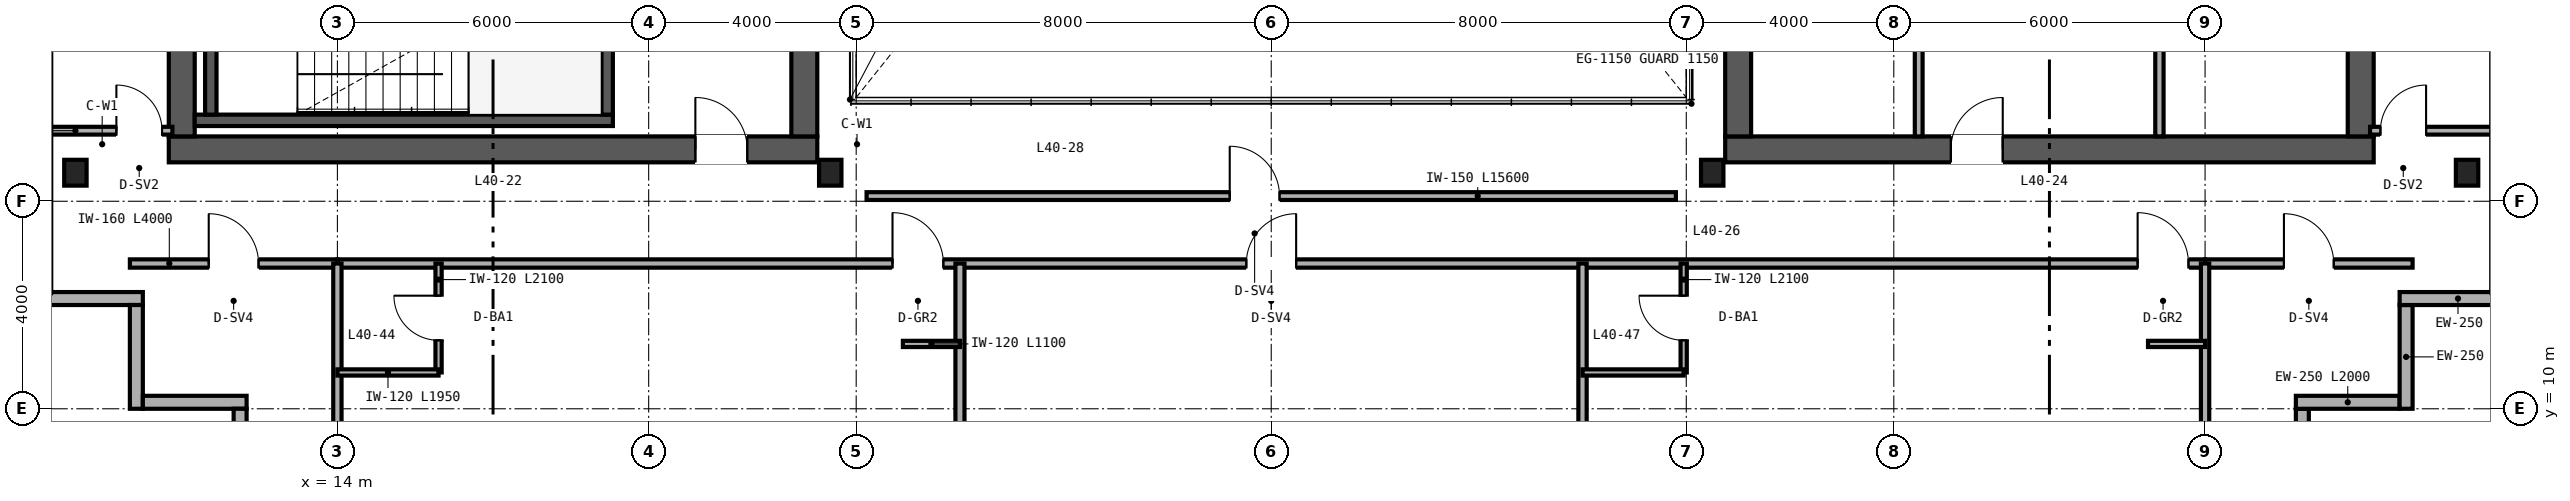
"""IFC4 building model, lengths in metres.
Left out: names, types, materials, properties, quantities, classifications, styles, units other than length and angle.
Written with IfcOpenShell. Run it as: python <this file> out.ifc"""

import sys

from ifc_helpers import new_model, si_unit, direction, frame, frame_2d, origin, origin_2d, place, context, subcontext, project, spatial, rectangle, i_section, extrude, source, transform, mapped, element, fill, save


model = new_model("IFC4")
c1 = context("Model", 3, precision=1e-05, world=origin(), true_north=direction((0.0, 1.0)))
c2 = subcontext(c1, "Body", "Model", "MODEL_VIEW")
j1 = project(units=[si_unit("LENGTHUNIT", "METRE"), si_unit("PLANEANGLEUNIT", "RADIAN")], contexts=[c1])
p1 = place(None, origin())
s1 = spatial("IfcSite", under=j1, at=p1, CompositionType="ELEMENT")
p2 = place(p1, origin())
s2 = spatial("IfcBuilding", under=s1, at=p2, CompositionType="ELEMENT")
p3 = place(p2, frame((0.0, 0.0, 163.2)))
s3 = spatial("IfcBuildingStorey", under=s2, at=p3, CompositionType="ELEMENT", Elevation=163.2)
p4 = place(p3, frame((10.75, 15.0, 0.0), z_axis=(0.0, 0.0, 1.0), x_axis=(1.0, 0.0, 0.0)))
e1 = element("IfcWall", 1, at=p4, inside=s3, PredefinedType="SHEAR", context=c2, shape_type="SweptSolid", body=[
    extrude(rectangle(XDim=12.5, YDim=0.5, at=frame_2d((6.25, 0.0))), origin(), (0.0, 0.0, 1.0), 3.37),
])
p5 = place(p4, frame((10.15, 0.0, 0.0)))
e2 = element("IfcOpeningElement", 2, at=p5, cuts=e1, PredefinedType="OPENING", context=c2, shape_type="SweptSolid", body=[
    extrude(rectangle(XDim=1.0, YDim=2.15, at=frame_2d((0.5, 1.075))), frame((0.0, 0.26, 0.0), z_axis=(0.0, -1.0, 0.0), x_axis=(1.0, 0.0, 0.0)), (0.0, 0.0, 1.0), 0.52),
])
for number, where, z_axis, x_axis in (
    (3, (11.0, 15.25, 0.0), (0.0, 0.0, 1.0), (0.0, 1.0, 0.0)),
    (4, (23.0, 15.25, 0.0), (0.0, 0.0, 1.0), (0.0, 1.0, 0.0)),
):
    element("IfcWall", number, at=place(p3, frame(where, z_axis=z_axis, x_axis=x_axis)), inside=s3, PredefinedType="SHEAR", context=c2, shape_type="SweptSolid", body=[
        extrude(rectangle(XDim=21.5, YDim=0.5, at=frame_2d((10.75, 0.0))), origin(), (0.0, 0.0, 1.0), 3.37),
    ])
p6 = place(p3, frame((40.75, 15.0, 0.0), z_axis=(0.0, 0.0, 1.0), x_axis=(1.0, 0.0, 0.0)))
e5 = element("IfcWall", 5, at=p6, inside=s3, PredefinedType="SHEAR", context=c2, shape_type="SweptSolid", body=[
    extrude(rectangle(XDim=12.5, YDim=0.5, at=frame_2d((6.25, 0.0))), origin(), (0.0, 0.0, 1.0), 3.37),
])
p7 = place(p6, frame((4.35, 0.0, 0.0)))
e6 = element("IfcOpeningElement", 6, at=p7, cuts=e5, PredefinedType="OPENING", context=c2, shape_type="SweptSolid", body=[
    extrude(rectangle(XDim=1.0, YDim=2.15, at=frame_2d((0.5, 1.075))), frame((0.0, 0.26, 0.0), z_axis=(0.0, -1.0, 0.0), x_axis=(1.0, 0.0, 0.0)), (0.0, 0.0, 1.0), 0.52),
])
for number, where, z_axis, x_axis in (
    (7, (41.0, 15.25, 0.0), (0.0, 0.0, 1.0), (0.0, 1.0, 0.0)),
    (8, (53.0, 15.25, 0.0), (0.0, 0.0, 1.0), (0.0, 1.0, 0.0)),
):
    element("IfcWall", number, at=place(p3, frame(where, z_axis=z_axis, x_axis=x_axis)), inside=s3, PredefinedType="SHEAR", context=c2, shape_type="SweptSolid", body=[
        extrude(rectangle(XDim=21.5, YDim=0.5, at=frame_2d((10.75, 0.0))), origin(), (0.0, 0.0, 1.0), 3.37),
    ])
p8 = place(p3, frame((11.25, 15.56, 0.0), z_axis=(0.0, 0.0, 1.0), x_axis=(1.0, 0.0, 0.0)))
e9 = element("IfcWall", 9, at=p8, inside=s3, PredefinedType="SHEAR", context=c2, shape_type="SweptSolid", body=[
    extrude(rectangle(XDim=8.06, YDim=0.22, at=frame_2d((4.03, 0.0))), origin(), (0.0, 0.0, 1.0), 3.4),
])
for number, where, z_axis, x_axis in (
    (10, (11.56, 15.67, 0.0), (0.0, 0.0, 1.0), (0.0, 1.0, 0.0)),
    (11, (19.2, 15.67, 0.0), (0.0, 0.0, 1.0), (0.0, 1.0, 0.0)),
):
    element("IfcWall", number, at=place(p3, frame(where, z_axis=z_axis, x_axis=x_axis)), inside=s3, PredefinedType="SHEAR", context=c2, shape_type="SweptSolid", body=[
        extrude(rectangle(XDim=3.28, YDim=0.22, at=frame_2d((1.64, 0.0))), origin(), (0.0, 0.0, 1.0), 3.4),
    ])
m1 = source(origin(), c2, "Body", "SweptSolid", [
    extrude(i_section(OverallWidth=0.432, OverallDepth=0.498, WebThickness=0.056, FlangeThickness=0.089, FilletRadius=0.025, at=origin_2d()), origin(), (0.0, 0.0, 1.0), 3.37),
])
for number, where, z_axis, x_axis in (
    (12, (8.95, 14.55, 0.0), (0.0, 0.0, 1.0), (1.0, 0.0, 0.0)),
    (13, (23.5, 14.55, 0.0), (0.0, 0.0, 1.0), (1.0, 0.0, 0.0)),
    (14, (40.5, 14.55, 0.0), (0.0, 0.0, 1.0), (1.0, 0.0, 0.0)),
    (15, (55.05, 14.55, 0.0), (0.0, 0.0, 1.0), (1.0, 0.0, 0.0)),
):
    element("IfcColumn", number, at=place(p3, frame(where, z_axis=z_axis, x_axis=x_axis)), inside=s3, PredefinedType="COLUMN", context=c2, shape_type="MappedRepresentation", body=[
        mapped(m1, transform((0.0, 0.0, 0.0), scale=1.0)),
    ])
p9 = place(p3, frame((51.875, 8.0, 0.0), z_axis=(0.0, 0.0, 1.0), x_axis=(0.0, 1.0, 0.0)))
e16 = element("IfcWall", 16, at=p9, inside=s3, PredefinedType="SOLIDWALL", context=c2, shape_type="SweptSolid", body=[
    extrude(rectangle(XDim=2.0, YDim=0.25, at=frame_2d((1.0, 0.0))), origin(), (0.0, 0.0, 1.0), 3.37),
])
p10 = place(p9, frame((0.5, 0.0, 0.85)))
e17 = element("IfcOpeningElement", 17, at=p10, cuts=e16, PredefinedType="OPENING", context=c2, shape_type="SweptSolid", body=[
    extrude(rectangle(XDim=1.0, YDim=1.9, at=frame_2d((0.5, 0.95))), frame((0.0, 0.135, 0.0), z_axis=(0.0, -1.0, 0.0), x_axis=(1.0, 0.0, 0.0)), (0.0, 0.0, 1.0), 0.27),
])
for number, where, z_axis, x_axis in (
    (18, (51.75, 10.125, 0.0), (0.0, 0.0, 1.0), (1.0, 0.0, 0.0)),
    (19, (53.875, 10.0, 0.0), (0.0, 0.0, 1.0), (0.0, 1.0, 0.0)),
):
    element("IfcWall", number, at=place(p3, frame(where, z_axis=z_axis, x_axis=x_axis)), inside=s3, PredefinedType="SOLIDWALL", context=c2, shape_type="SweptSolid", body=[
        extrude(rectangle(XDim=2.0, YDim=0.25, at=frame_2d((1.0, 0.0))), origin(), (0.0, 0.0, 1.0), 3.37),
    ])
for number, where, z_axis, x_axis in (
    (20, (53.75, 12.125, 0.0), (0.0, 0.0, 1.0), (1.0, 0.0, 0.0)),
    (21, (8.0, 12.125, 0.0), (0.0, 0.0, 1.0), (1.0, 0.0, 0.0)),
):
    element("IfcWall", number, at=place(p3, frame(where, z_axis=z_axis, x_axis=x_axis)), inside=s3, PredefinedType="SOLIDWALL", context=c2, shape_type="SweptSolid", body=[
        extrude(rectangle(XDim=2.25, YDim=0.25, at=frame_2d((1.125, 0.0))), origin(), (0.0, 0.0, 1.0), 3.37),
    ])
for number, where, z_axis, x_axis in (
    (22, (10.125, 12.0, 0.0), (0.0, 0.0, 1.0), (0.0, -1.0, 0.0)),
    (23, (10.25, 10.125, 0.0), (0.0, 0.0, 1.0), (1.0, 0.0, 0.0)),
    (24, (12.125, 10.0, 0.0), (0.0, 0.0, 1.0), (0.0, -1.0, 0.0)),
):
    element("IfcWall", number, at=place(p3, frame(where, z_axis=z_axis, x_axis=x_axis)), inside=s3, PredefinedType="SOLIDWALL", context=c2, shape_type="SweptSolid", body=[
        extrude(rectangle(XDim=2.0, YDim=0.25, at=frame_2d((1.0, 0.0))), origin(), (0.0, 0.0, 1.0), 3.37),
    ])
p11 = place(p3, frame((49.12, 15.25, 0.0), z_axis=(0.0, 0.0, 1.0), x_axis=(0.0, 1.0, 0.0)))
e25 = element("IfcWall", 25, at=p11, inside=s3, PredefinedType="PARTITIONING", context=c2, shape_type="SweptSolid", body=[
    extrude(rectangle(XDim=16.13, YDim=0.16, at=frame_2d((8.065, 0.0))), origin(), (0.0, 0.0, 1.0), 2.443),
])
p12 = place(p11, frame((4.0, 0.0, 0.0)))
e26 = element("IfcOpeningElement", 26, at=p12, cuts=e25, PredefinedType="OPENING", context=c2, shape_type="SweptSolid", body=[
    extrude(rectangle(XDim=0.92, YDim=2.15, at=frame_2d((0.46, 1.075))), frame((0.0, 0.09, 0.0), z_axis=(0.0, -1.0, 0.0), x_axis=(1.0, 0.0, 0.0)), (0.0, 0.0, 1.0), 0.18),
])
p13 = place(p11, frame((12.0, 0.0, 0.0)))
e27 = element("IfcOpeningElement", 27, at=p13, cuts=e25, PredefinedType="OPENING", context=c2, shape_type="SweptSolid", body=[
    extrude(rectangle(XDim=0.92, YDim=2.15, at=frame_2d((0.46, 1.075))), frame((0.0, 0.09, 0.0), z_axis=(0.0, -1.0, 0.0), x_axis=(1.0, 0.0, 0.0)), (0.0, 0.0, 1.0), 0.18),
])
p14 = place(p3, frame((44.48, 15.25, 0.0), z_axis=(0.0, 0.0, 1.0), x_axis=(0.0, 1.0, 0.0)))
e28 = element("IfcWall", 28, at=p14, inside=s3, PredefinedType="PARTITIONING", context=c2, shape_type="SweptSolid", body=[
    extrude(rectangle(XDim=11.63, YDim=0.15, at=frame_2d((5.815, 0.0))), origin(), (0.0, 0.0, 1.0), 3.37),
])
p15 = place(p14, frame((4.5, 0.0, 0.0)))
e29 = element("IfcOpeningElement", 29, at=p15, cuts=e28, PredefinedType="OPENING", context=c2, shape_type="SweptSolid", body=[
    extrude(rectangle(XDim=0.92, YDim=2.15, at=frame_2d((0.46, 1.075))), frame((0.0, 0.085, 0.0), z_axis=(0.0, -1.0, 0.0), x_axis=(1.0, 0.0, 0.0)), (0.0, 0.0, 1.0), 0.17),
])
p16 = place(p3, frame((24.2, 14.1, 0.0), z_axis=(0.0, 0.0, 1.0), x_axis=(1.0, 0.0, 0.0)))
e30 = element("IfcWall", 30, at=p16, inside=s3, PredefinedType="PARTITIONING", context=c2, shape_type="SweptSolid", body=[
    extrude(rectangle(XDim=15.6, YDim=0.15, at=frame_2d((7.8, 0.0))), origin(), (0.0, 0.0, 1.0), 3.37),
])
p17 = place(p16, frame((7.0, 0.0, 0.0)))
e31 = element("IfcOpeningElement", 31, at=p17, cuts=e30, PredefinedType="OPENING", context=c2, shape_type="SweptSolid", body=[
    extrude(rectangle(XDim=0.96, YDim=2.15, at=frame_2d((0.48, 1.075))), frame((0.0, 0.085, 0.0), z_axis=(0.0, -1.0, 0.0), x_axis=(1.0, 0.0, 0.0)), (0.0, 0.0, 1.0), 0.17),
])
p18 = place(p3, frame((8.16, 15.36, 0.0), z_axis=(0.0, 0.0, 1.0), x_axis=(1.0, 0.0, 0.0)))
e32 = element("IfcWall", 32, at=p18, inside=s3, PredefinedType="PARTITIONING", context=c2, shape_type="SweptSolid", body=[
    extrude(rectangle(XDim=2.66, YDim=0.15, at=frame_2d((1.33, 0.0))), origin(), (0.0, 0.0, 1.0), 2.591),
])
p19 = place(p18, frame((1.58, 0.0, 0.0)))
e33 = element("IfcOpeningElement", 33, at=p19, cuts=e32, PredefinedType="OPENING", context=c2, shape_type="SweptSolid", body=[
    extrude(rectangle(XDim=0.88, YDim=2.15, at=frame_2d((0.44, 1.075))), frame((0.0, 0.085, 0.0), z_axis=(0.0, -1.0, 0.0), x_axis=(1.0, 0.0, 0.0)), (0.0, 0.0, 1.0), 0.17),
])
p20 = place(p3, frame((53.18, 15.36, 0.0), z_axis=(0.0, 0.0, 1.0), x_axis=(1.0, 0.0, 0.0)))
e34 = element("IfcWall", 34, at=p20, inside=s3, PredefinedType="PARTITIONING", context=c2, shape_type="SweptSolid", body=[
    extrude(rectangle(XDim=2.66, YDim=0.15, at=frame_2d((1.33, 0.0))), origin(), (0.0, 0.0, 1.0), 2.591),
])
p21 = place(p20, frame((0.2, 0.0, 0.0)))
e35 = element("IfcOpeningElement", 35, at=p21, cuts=e34, PredefinedType="OPENING", context=c2, shape_type="SweptSolid", body=[
    extrude(rectangle(XDim=0.88, YDim=2.15, at=frame_2d((0.44, 1.075))), frame((0.0, 0.085, 0.0), z_axis=(0.0, -1.0, 0.0), x_axis=(1.0, 0.0, 0.0)), (0.0, 0.0, 1.0), 0.17),
])
p22 = place(p3, frame((10.0, 12.8, 0.0), z_axis=(0.0, 0.0, 1.0), x_axis=(1.0, 0.0, 0.0)))
e36 = element("IfcWall", 36, at=p22, inside=s3, PredefinedType="PARTITIONING", context=c2, shape_type="SweptSolid", body=[
    extrude(rectangle(XDim=4.0, YDim=0.16, at=frame_2d((2.0, 0.0))), origin(), (0.0, 0.0, 1.0), 3.37),
])
p23 = place(p22, frame((1.52, 0.0, 0.0)))
e37 = element("IfcOpeningElement", 37, at=p23, cuts=e36, PredefinedType="OPENING", context=c2, shape_type="SweptSolid", body=[
    extrude(rectangle(XDim=0.96, YDim=2.15, at=frame_2d((0.48, 1.075))), frame((0.0, 0.09, 0.0), z_axis=(0.0, -1.0, 0.0), x_axis=(1.0, 0.0, 0.0)), (0.0, 0.0, 1.0), 0.18),
])
p24 = place(p3, frame((50.0, 12.8, 0.0), z_axis=(0.0, 0.0, 1.0), x_axis=(1.0, 0.0, 0.0)))
e38 = element("IfcWall", 38, at=p24, inside=s3, PredefinedType="PARTITIONING", context=c2, shape_type="SweptSolid", body=[
    extrude(rectangle(XDim=4.0, YDim=0.16, at=frame_2d((2.0, 0.0))), origin(), (0.0, 0.0, 1.0), 3.37),
])
p25 = place(p24, frame((1.52, 0.0, 0.0)))
e39 = element("IfcOpeningElement", 39, at=p25, cuts=e38, PredefinedType="OPENING", context=c2, shape_type="SweptSolid", body=[
    extrude(rectangle(XDim=0.96, YDim=2.15, at=frame_2d((0.48, 1.075))), frame((0.0, 0.09, 0.0), z_axis=(0.0, -1.0, 0.0), x_axis=(1.0, 0.0, 0.0)), (0.0, 0.0, 1.0), 0.18),
])
p26 = place(p3, frame((14.0, 12.8, 0.0), z_axis=(0.0, 0.0, 1.0), x_axis=(1.0, 0.0, 0.0)))
e40 = element("IfcWall", 40, at=p26, inside=s3, PredefinedType="PARTITIONING", context=c2, shape_type="SweptSolid", body=[
    extrude(rectangle(XDim=36.0, YDim=0.16, at=frame_2d((18.0, 0.0))), origin(), (0.0, 0.0, 1.0), 2.913),
])
p27 = place(p26, frame((10.7, 0.0, 0.0)))
e41 = element("IfcOpeningElement", 41, at=p27, cuts=e40, PredefinedType="OPENING", context=c2, shape_type="SweptSolid", body=[
    extrude(rectangle(XDim=0.98, YDim=2.2, at=frame_2d((0.49, 1.1))), frame((0.0, 0.09, 0.0), z_axis=(0.0, -1.0, 0.0), x_axis=(1.0, 0.0, 0.0)), (0.0, 0.0, 1.0), 0.18),
])
p28 = place(p26, frame((17.52, 0.0, 0.0)))
e42 = element("IfcOpeningElement", 42, at=p28, cuts=e40, PredefinedType="OPENING", context=c2, shape_type="SweptSolid", body=[
    extrude(rectangle(XDim=0.96, YDim=2.15, at=frame_2d((0.48, 1.075))), frame((0.0, 0.09, 0.0), z_axis=(0.0, -1.0, 0.0), x_axis=(1.0, 0.0, 0.0)), (0.0, 0.0, 1.0), 0.18),
])
p29 = place(p26, frame((34.7, 0.0, 0.0)))
e43 = element("IfcOpeningElement", 43, at=p29, cuts=e40, PredefinedType="OPENING", context=c2, shape_type="SweptSolid", body=[
    extrude(rectangle(XDim=0.98, YDim=2.2, at=frame_2d((0.49, 1.1))), frame((0.0, 0.09, 0.0), z_axis=(0.0, -1.0, 0.0), x_axis=(1.0, 0.0, 0.0)), (0.0, 0.0, 1.0), 0.18),
])
for number, where, z_axis, x_axis in (
    (44, (14.0, 6.36, 0.0), (0.0, 0.0, 1.0), (0.0, 1.0, 0.0)),
    (45, (50.0, 6.36, 0.0), (0.0, 0.0, 1.0), (0.0, 1.0, 0.0)),
):
    element("IfcWall", number, at=place(p3, frame(where, z_axis=z_axis, x_axis=x_axis)), inside=s3, PredefinedType="PARTITIONING", context=c2, shape_type="SweptSolid", body=[
        extrude(rectangle(XDim=6.44, YDim=0.16, at=frame_2d((3.22, 0.0))), origin(), (0.0, 0.0, 1.0), 2.677),
    ])
p30 = place(p3, frame((26.0, 6.36, 0.0), z_axis=(0.0, 0.0, 1.0), x_axis=(0.0, 1.0, 0.0)))
e46 = element("IfcWall", 46, at=p30, inside=s3, PredefinedType="PARTITIONING", context=c2, shape_type="SweptSolid", body=[
    extrude(rectangle(XDim=6.44, YDim=0.175, at=frame_2d((3.22, 0.0))), origin(), (0.0, 0.0, 1.0), 2.443),
])
p31 = place(p3, frame((15.95, 10.7, 0.0), z_axis=(0.0, 0.0, 1.0), x_axis=(0.0, 1.0, 0.0)))
e47 = element("IfcWall", 47, at=p31, inside=s3, PredefinedType="PARTITIONING", context=c2, shape_type="SweptSolid", body=[
    extrude(rectangle(XDim=2.1, YDim=0.12, at=frame_2d((1.05, 0.0))), origin(), (0.0, 0.0, 1.0), 3.37),
])
p32 = place(p31, frame((0.62, 0.0, 0.0)))
e48 = element("IfcOpeningElement", 48, at=p32, cuts=e47, PredefinedType="OPENING", context=c2, shape_type="SweptSolid", body=[
    extrude(rectangle(XDim=0.86, YDim=2.1, at=frame_2d((0.43, 1.05))), frame((0.0, 0.07, 0.0), z_axis=(0.0, -1.0, 0.0), x_axis=(1.0, 0.0, 0.0)), (0.0, 0.0, 1.0), 0.14),
])
p33 = place(p3, frame((14.0, 10.7, 0.0), z_axis=(0.0, 0.0, 1.0), x_axis=(1.0, 0.0, 0.0)))
e49 = element("IfcWall", 49, at=p33, inside=s3, PredefinedType="PARTITIONING", context=c2, shape_type="SweptSolid", body=[
    extrude(rectangle(XDim=1.95, YDim=0.12, at=frame_2d((0.975, 0.0))), origin(), (0.0, 0.0, 1.0), 3.37),
])
p34 = place(p3, frame((24.9, 11.25, 0.0), z_axis=(0.0, 0.0, 1.0), x_axis=(1.0, 0.0, 0.0)))
e50 = element("IfcWall", 50, at=p34, inside=s3, PredefinedType="PARTITIONING", context=c2, shape_type="SweptSolid", body=[
    extrude(rectangle(XDim=1.1, YDim=0.12, at=frame_2d((0.55, 0.0))), origin(), (0.0, 0.0, 1.0), 3.37),
])
p35 = place(p3, frame((38.0, 6.36, 0.0), z_axis=(0.0, 0.0, 1.0), x_axis=(0.0, 1.0, 0.0)))
e51 = element("IfcWall", 51, at=p35, inside=s3, PredefinedType="PARTITIONING", context=c2, shape_type="SweptSolid", body=[
    extrude(rectangle(XDim=6.44, YDim=0.16, at=frame_2d((3.22, 0.0))), origin(), (0.0, 0.0, 1.0), 2.443),
])
p36 = place(p3, frame((39.95, 10.7, 0.0), z_axis=(0.0, 0.0, 1.0), x_axis=(0.0, 1.0, 0.0)))
e52 = element("IfcWall", 52, at=p36, inside=s3, PredefinedType="PARTITIONING", context=c2, shape_type="SweptSolid", body=[
    extrude(rectangle(XDim=2.1, YDim=0.12, at=frame_2d((1.05, 0.0))), origin(), (0.0, 0.0, 1.0), 3.37),
])
p37 = place(p36, frame((0.62, 0.0, 0.0)))
e53 = element("IfcOpeningElement", 53, at=p37, cuts=e52, PredefinedType="OPENING", context=c2, shape_type="SweptSolid", body=[
    extrude(rectangle(XDim=0.86, YDim=2.1, at=frame_2d((0.43, 1.05))), frame((0.0, 0.07, 0.0), z_axis=(0.0, -1.0, 0.0), x_axis=(1.0, 0.0, 0.0)), (0.0, 0.0, 1.0), 0.14),
])
p38 = place(p3, frame((38.0, 10.7, 0.0), z_axis=(0.0, 0.0, 1.0), x_axis=(1.0, 0.0, 0.0)))
e54 = element("IfcWall", 54, at=p38, inside=s3, PredefinedType="PARTITIONING", context=c2, shape_type="SweptSolid", body=[
    extrude(rectangle(XDim=1.95, YDim=0.12, at=frame_2d((0.975, 0.0))), origin(), (0.0, 0.0, 1.0), 3.37),
])
p39 = place(p3, frame((48.9, 11.25, 0.0), z_axis=(0.0, 0.0, 1.0), x_axis=(1.0, 0.0, 0.0)))
e55 = element("IfcWall", 55, at=p39, inside=s3, PredefinedType="PARTITIONING", context=c2, shape_type="SweptSolid", body=[
    extrude(rectangle(XDim=1.1, YDim=0.12, at=frame_2d((0.55, 0.0))), origin(), (0.0, 0.0, 1.0), 3.37),
])
m2 = source(origin(), c2, "Body", "SweptSolid", [
    extrude(rectangle(XDim=1.0, YDim=2.15, at=frame_2d((0.5, 1.075))), frame((0.0, 0.025, 0.0), z_axis=(0.0, -1.0, 0.0), x_axis=(1.0, 0.0, 0.0)), (0.0, 0.0, 1.0), 0.05),
])
p40 = place(p5, origin())
e56 = element("IfcDoor", 56, at=p40, inside=s3, OperationType="SINGLE_SWING_LEFT", PredefinedType="DOOR", context=c2, shape_type="MappedRepresentation", body=[
    mapped(m2, transform((0.0, 0.0, 0.0), scale=1.0)),
])
fill(e2, e56)
p41 = place(p7, origin())
e57 = element("IfcDoor", 57, at=p41, inside=s3, OperationType="SINGLE_SWING_RIGHT", PredefinedType="DOOR", context=c2, shape_type="MappedRepresentation", body=[
    mapped(m2, transform((0.0, 0.0, 0.0), scale=1.0)),
])
fill(e6, e57)
m3 = source(origin(), c2, "Body", "SweptSolid", [
    extrude(rectangle(XDim=0.96, YDim=2.15, at=frame_2d((0.48, 1.075))), frame((0.0, 0.025, 0.0), z_axis=(0.0, -1.0, 0.0), x_axis=(1.0, 0.0, 0.0)), (0.0, 0.0, 1.0), 0.05),
])
p42 = place(p17, origin())
e58 = element("IfcDoor", 58, at=p42, inside=s3, OperationType="SINGLE_SWING_LEFT", PredefinedType="DOOR", context=c2, shape_type="MappedRepresentation", body=[
    mapped(m3, transform((0.0, 0.0, 0.0), scale=1.0)),
])
fill(e31, e58)
m4 = source(origin(), c2, "Body", "SweptSolid", [
    extrude(rectangle(XDim=0.88, YDim=2.15, at=frame_2d((0.44, 1.075))), frame((0.0, 0.025, 0.0), z_axis=(0.0, -1.0, 0.0), x_axis=(1.0, 0.0, 0.0)), (0.0, 0.0, 1.0), 0.05),
])
p43 = place(p19, origin())
e59 = element("IfcDoor", 59, at=p43, inside=s3, OperationType="SINGLE_SWING_LEFT", PredefinedType="DOOR", context=c2, shape_type="MappedRepresentation", body=[
    mapped(m4, transform((0.0, 0.0, 0.0), scale=1.0)),
])
fill(e33, e59)
p44 = place(p21, origin())
e60 = element("IfcDoor", 60, at=p44, inside=s3, OperationType="SINGLE_SWING_RIGHT", PredefinedType="DOOR", context=c2, shape_type="MappedRepresentation", body=[
    mapped(m4, transform((0.0, 0.0, 0.0), scale=1.0)),
])
fill(e35, e60)
p45 = place(p23, origin())
e61 = element("IfcDoor", 61, at=p45, inside=s3, OperationType="SINGLE_SWING_LEFT", PredefinedType="DOOR", context=c2, shape_type="MappedRepresentation", body=[
    mapped(m3, transform((0.0, 0.0, 0.0), scale=1.0)),
])
fill(e37, e61)
p46 = place(p25, origin())
e62 = element("IfcDoor", 62, at=p46, inside=s3, OperationType="SINGLE_SWING_LEFT", PredefinedType="DOOR", context=c2, shape_type="MappedRepresentation", body=[
    mapped(m3, transform((0.0, 0.0, 0.0), scale=1.0)),
])
fill(e39, e62)
m5 = source(origin(), c2, "Body", "SweptSolid", [
    extrude(rectangle(XDim=0.86, YDim=2.1, at=frame_2d((0.43, 1.05))), frame((0.0, 0.025, 0.0), z_axis=(0.0, -1.0, 0.0), x_axis=(1.0, 0.0, 0.0)), (0.0, 0.0, 1.0), 0.05),
])
p47 = place(p32, origin())
e63 = element("IfcDoor", 63, at=p47, inside=s3, OperationType="SINGLE_SWING_RIGHT", PredefinedType="DOOR", context=c2, shape_type="MappedRepresentation", body=[
    mapped(m5, transform((0.0, 0.0, 0.0), scale=1.0)),
])
fill(e48, e63)
p48 = place(p37, origin())
e64 = element("IfcDoor", 64, at=p48, inside=s3, OperationType="SINGLE_SWING_RIGHT", PredefinedType="DOOR", context=c2, shape_type="MappedRepresentation", body=[
    mapped(m5, transform((0.0, 0.0, 0.0), scale=1.0)),
])
fill(e53, e64)
m6 = source(origin(), c2, "Body", "SweptSolid", [
    extrude(rectangle(XDim=0.98, YDim=2.2, at=frame_2d((0.49, 1.1))), frame((0.0, 0.025, 0.0), z_axis=(0.0, -1.0, 0.0), x_axis=(1.0, 0.0, 0.0)), (0.0, 0.0, 1.0), 0.05),
])
p49 = place(p27, origin())
e65 = element("IfcDoor", 65, at=p49, inside=s3, OperationType="SINGLE_SWING_LEFT", PredefinedType="DOOR", context=c2, shape_type="MappedRepresentation", body=[
    mapped(m6, transform((0.0, 0.0, 0.0), scale=1.0)),
])
fill(e41, e65)
p50 = place(p28, origin())
e66 = element("IfcDoor", 66, at=p50, inside=s3, OperationType="SINGLE_SWING_RIGHT", PredefinedType="DOOR", context=c2, shape_type="MappedRepresentation", body=[
    mapped(m3, transform((0.0, 0.0, 0.0), scale=1.0)),
])
fill(e42, e66)
p51 = place(p29, origin())
e67 = element("IfcDoor", 67, at=p51, inside=s3, OperationType="SINGLE_SWING_LEFT", PredefinedType="DOOR", context=c2, shape_type="MappedRepresentation", body=[
    mapped(m6, transform((0.0, 0.0, 0.0), scale=1.0)),
])
fill(e43, e67)
save(model, sys.argv[1])
